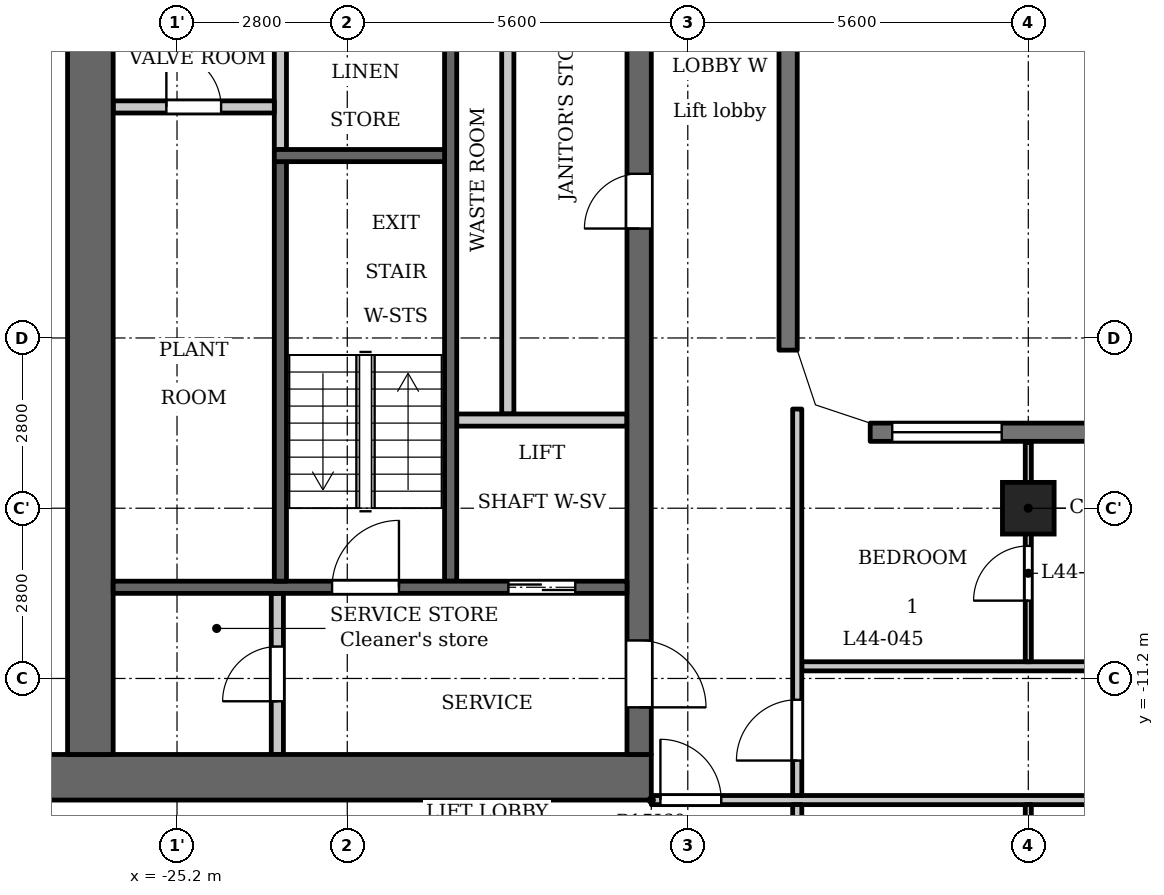
"""IFC4 building model, lengths in metres.
Left out: names, types, materials, properties, quantities, classifications, styles, units other than length and angle.
Written with IfcOpenShell. Run it as: python <this file> out.ifc"""

import sys

from ifc_helpers import new_model, si_unit, direction, frame, frame_2d, origin, origin_2d, place, context, subcontext, project, spatial, polyline, rectangle, outline, extrude, element, fill, save


model = new_model("IFC4")
c1 = context("Model", 3, precision=1e-05, world=origin(), true_north=direction((0.0, 1.0)))
c2 = subcontext(c1, "Body", "Model", "MODEL_VIEW")
j1 = project(units=[si_unit("LENGTHUNIT", "METRE"), si_unit("PLANEANGLEUNIT", "RADIAN")], contexts=[c1])
p1 = place(None, origin())
s1 = spatial("IfcSite", under=j1, at=p1, CompositionType="ELEMENT")
p2 = place(p1, origin())
s2 = spatial("IfcBuilding", under=s1, at=p2, CompositionType="ELEMENT")
p3 = place(p2, frame((0.0, 0.0, 171.1)))
s3 = spatial("IfcBuildingStorey", under=s2, at=p3, CompositionType="ELEMENT", Elevation=171.1)
p4 = place(p3, frame((-11.2, -8.4, 0.0), z_axis=(0.0, 0.0, 1.0), x_axis=(1.0, 0.0, 0.0)))
e1 = element("IfcColumn", 1, at=p4, inside=s3, PredefinedType="COLUMN", context=c2, shape_type="SweptSolid", body=[
    extrude(rectangle(XDim=0.85, YDim=0.85, at=origin_2d()), origin(), (0.0, 0.0, 1.0), 3.5),
])
p5 = place(p3, frame((-15.15, -5.8, 0.0), z_axis=(0.0, 0.0, 1.0), x_axis=(0.0, 1.0, 0.0)))
e2 = element("IfcWall", 2, at=p5, inside=s3, PredefinedType="SOLIDWALL", context=c2, shape_type="SweptSolid", body=[
    extrude(rectangle(XDim=11.6, YDim=0.3, at=frame_2d((5.8, 0.0))), origin(), (0.0, 0.0, 1.0), 3.2),
])
p6 = place(p3, frame((13.8, -7.15, 0.0), z_axis=(0.0, 0.0, 1.0), x_axis=(-1.0, 0.0, 0.0)))
e3 = element("IfcWall", 3, at=p6, inside=s3, PredefinedType="SOLIDWALL", context=c2, shape_type="SweptSolid", body=[
    extrude(rectangle(XDim=27.6, YDim=0.3, at=frame_2d((13.8, 0.0))), origin(), (0.0, 0.0, 1.0), 3.2),
])
p7 = place(p6, frame((0.363, 0.0, 0.9)))
e4 = element("IfcOpeningElement", 4, at=p7, cuts=e3, PredefinedType="OPENING", context=c2, shape_type="SweptSolid", body=[
    extrude(rectangle(XDim=1.8, YDim=1.25, at=frame_2d((0.9, 0.625))), frame((0.0, 0.16, 0.0), z_axis=(0.0, -1.0, 0.0), x_axis=(1.0, 0.0, 0.0)), (0.0, 0.0, 1.0), 0.32),
])
p8 = place(p6, frame((3.6, 0.0, 1.2)))
e5 = element("IfcOpeningElement", 5, at=p8, cuts=e3, PredefinedType="OPENING", context=c2, shape_type="SweptSolid", body=[
    extrude(rectangle(XDim=3.6, YDim=0.95, at=frame_2d((1.8, 0.475))), frame((0.0, 0.16, 0.0), z_axis=(0.0, -1.0, 0.0), x_axis=(1.0, 0.0, 0.0)), (0.0, 0.0, 1.0), 0.32),
])
p9 = place(p6, frame((8.9, 0.0, 0.9)))
e6 = element("IfcOpeningElement", 6, at=p9, cuts=e3, PredefinedType="OPENING", context=c2, shape_type="SweptSolid", body=[
    extrude(rectangle(XDim=1.8, YDim=1.25, at=frame_2d((0.9, 0.625))), frame((0.0, 0.16, 0.0), z_axis=(0.0, -1.0, 0.0), x_axis=(1.0, 0.0, 0.0)), (0.0, 0.0, 1.0), 0.32),
])
p10 = place(p6, frame((12.0, 0.0, 0.6)))
e7 = element("IfcOpeningElement", 7, at=p10, cuts=e3, PredefinedType="OPENING", context=c2, shape_type="SweptSolid", body=[
    extrude(rectangle(XDim=1.2, YDim=1.55, at=frame_2d((0.6, 0.775))), frame((0.0, 0.16, 0.0), z_axis=(0.0, -1.0, 0.0), x_axis=(1.0, 0.0, 0.0)), (0.0, 0.0, 1.0), 0.32),
])
p11 = place(p6, frame((14.4, 0.0, 0.6)))
e8 = element("IfcOpeningElement", 8, at=p11, cuts=e3, PredefinedType="OPENING", context=c2, shape_type="SweptSolid", body=[
    extrude(rectangle(XDim=1.2, YDim=1.55, at=frame_2d((0.6, 0.775))), frame((0.0, 0.16, 0.0), z_axis=(0.0, -1.0, 0.0), x_axis=(1.0, 0.0, 0.0)), (0.0, 0.0, 1.0), 0.32),
])
p12 = place(p6, frame((16.9, 0.0, 0.9)))
e9 = element("IfcOpeningElement", 9, at=p12, cuts=e3, PredefinedType="OPENING", context=c2, shape_type="SweptSolid", body=[
    extrude(rectangle(XDim=1.8, YDim=1.25, at=frame_2d((0.9, 0.625))), frame((0.0, 0.16, 0.0), z_axis=(0.0, -1.0, 0.0), x_axis=(1.0, 0.0, 0.0)), (0.0, 0.0, 1.0), 0.32),
])
p13 = place(p6, frame((20.4, 0.0, 1.2)))
e10 = element("IfcOpeningElement", 10, at=p13, cuts=e3, PredefinedType="OPENING", context=c2, shape_type="SweptSolid", body=[
    extrude(rectangle(XDim=3.6, YDim=0.95, at=frame_2d((1.8, 0.475))), frame((0.0, 0.16, 0.0), z_axis=(0.0, -1.0, 0.0), x_axis=(1.0, 0.0, 0.0)), (0.0, 0.0, 1.0), 0.32),
])
p14 = place(p6, frame((25.438, 0.0, 0.9)))
e11 = element("IfcOpeningElement", 11, at=p14, cuts=e3, PredefinedType="OPENING", context=c2, shape_type="SweptSolid", body=[
    extrude(rectangle(XDim=1.8, YDim=1.25, at=frame_2d((0.9, 0.625))), frame((0.0, 0.16, 0.0), z_axis=(0.0, -1.0, 0.0), x_axis=(1.0, 0.0, 0.0)), (0.0, 0.0, 1.0), 0.32),
])
p15 = place(p3, frame((-23.5, -2.5, 0.0), z_axis=(0.0, 0.0, 1.0), x_axis=(0.0, 1.0, 0.0)))
e12 = element("IfcWall", 12, at=p15, inside=s3, PredefinedType="PARTITIONING", context=c2, shape_type="SweptSolid", body=[
    extrude(rectangle(XDim=2.65, YDim=0.2, at=frame_2d((1.325, 0.0))), origin(), (0.0, 0.0, 1.0), 3.2),
])
p16 = place(p3, frame((-20.7, -9.6, 0.0), z_axis=(0.0, 0.0, 1.0), x_axis=(0.0, 1.0, 0.0)))
e13 = element("IfcWall", 13, at=p16, inside=s3, PredefinedType="SHEAR", context=c2, shape_type="SweptSolid", body=[
    extrude(rectangle(XDim=9.75, YDim=0.2, at=frame_2d((4.875, 0.0))), origin(), (0.0, 0.0, 1.0), 3.2),
])
p17 = place(p3, frame((-17.4, -12.825, 0.0), z_axis=(0.0, 0.0, 1.0), x_axis=(-1.0, 0.0, 0.0)))
e14 = element("IfcWall", 14, at=p17, inside=s3, PredefinedType="SHEAR", context=c2, shape_type="SweptSolid", body=[
    extrude(rectangle(XDim=10.4, YDim=0.75, at=frame_2d((5.2, 0.0))), origin(), (0.0, 0.0, 1.0), 3.2),
])
p18 = place(p3, frame((-19.76, -6.85, 0.0), z_axis=(0.0, 0.0, 1.0), x_axis=(0.0, 1.0, 0.0)))
e15 = element("IfcWall", 15, at=p18, inside=s3, PredefinedType="PARTITIONING", context=c2, shape_type="SweptSolid", body=[
    extrude(rectangle(XDim=7.0, YDim=0.2, at=frame_2d((3.5, 0.0))), origin(), (0.0, 0.0, 1.0), 3.2),
])
p19 = place(p3, frame((-17.6, -12.45, 0.0), z_axis=(0.0, 0.0, 1.0), x_axis=(0.0, 1.0, 0.0)))
e16 = element("IfcWall", 16, at=p19, inside=s3, PredefinedType="SHEAR", context=c2, shape_type="SweptSolid", body=[
    extrude(rectangle(XDim=24.9, YDim=0.4, at=frame_2d((12.45, 0.0))), origin(), (0.0, 0.0, 1.0), 3.2),
])
p20 = place(p19, frame((8.65, 0.0, 0.0)))
e17 = element("IfcOpeningElement", 17, at=p20, cuts=e16, PredefinedType="OPENING", context=c2, shape_type="SweptSolid", body=[
    extrude(rectangle(XDim=0.9, YDim=2.1, at=frame_2d((0.45, 1.05))), frame((0.0, 0.21, 0.0), z_axis=(0.0, -1.0, 0.0), x_axis=(1.0, 0.0, 0.0)), (0.0, 0.0, 1.0), 0.42),
])
p21 = place(p19, frame((15.6, 0.0, 0.0)))
e18 = element("IfcOpeningElement", 18, at=p21, cuts=e16, PredefinedType="OPENING", context=c2, shape_type="SweptSolid", body=[
    extrude(rectangle(XDim=1.1, YDim=2.1, at=frame_2d((0.55, 1.05))), frame((0.0, 0.21, 0.0), z_axis=(0.0, -1.0, 0.0), x_axis=(1.0, 0.0, 0.0)), (0.0, 0.0, 1.0), 0.42),
])
p22 = place(p19, frame((18.0, 0.0, 0.0)))
e19 = element("IfcOpeningElement", 19, at=p22, cuts=e16, PredefinedType="OPENING", context=c2, shape_type="SweptSolid", body=[
    extrude(rectangle(XDim=1.1, YDim=2.1, at=frame_2d((0.55, 1.05))), frame((0.0, 0.21, 0.0), z_axis=(0.0, -1.0, 0.0), x_axis=(1.0, 0.0, 0.0)), (0.0, 0.0, 1.0), 0.42),
])
p23 = place(p19, frame((23.025, 0.0, 0.0)))
e20 = element("IfcOpeningElement", 20, at=p23, cuts=e16, PredefinedType="OPENING", context=c2, shape_type="SweptSolid", body=[
    extrude(rectangle(XDim=1.1, YDim=2.1, at=frame_2d((0.55, 1.05))), frame((0.0, 0.21, 0.0), z_axis=(0.0, -1.0, 0.0), x_axis=(1.0, 0.0, 0.0)), (0.0, 0.0, 1.0), 0.42),
])
p24 = place(p19, frame((0.775, 0.0, 0.0)))
e21 = element("IfcOpeningElement", 21, at=p24, cuts=e16, PredefinedType="OPENING", context=c2, shape_type="SweptSolid", body=[
    extrude(rectangle(XDim=1.1, YDim=2.1, at=frame_2d((0.55, 1.05))), frame((0.0, 0.21, 0.0), z_axis=(0.0, -1.0, 0.0), x_axis=(1.0, 0.0, 0.0)), (0.0, 0.0, 1.0), 0.42),
])
p25 = place(p19, frame((12.925, 0.0, 0.0)))
e22 = element("IfcOpeningElement", 22, at=p25, cuts=e16, PredefinedType="OPENING", context=c2, shape_type="SweptSolid", body=[
    extrude(rectangle(XDim=1.8, YDim=2.1, at=frame_2d((0.9, 1.05))), frame((0.0, 0.21, 0.0), z_axis=(0.0, -1.0, 0.0), x_axis=(1.0, 0.0, 0.0)), (0.0, 0.0, 1.0), 0.42),
])
p26 = place(p3, frame((-26.625, -12.45, 0.0), z_axis=(0.0, 0.0, 1.0), x_axis=(0.0, 1.0, 0.0)))
e23 = element("IfcWall", 23, at=p26, inside=s3, PredefinedType="SHEAR", context=c2, shape_type="SweptSolid", body=[
    extrude(rectangle(XDim=24.9, YDim=0.75, at=frame_2d((12.45, 0.0))), origin(), (0.0, 0.0, 1.0), 3.2),
])
p27 = place(p3, frame((-23.55, -12.45, 0.0), z_axis=(0.0, 0.0, 1.0), x_axis=(0.0, 1.0, 0.0)))
e24 = element("IfcWall", 24, at=p27, inside=s3, PredefinedType="PARTITIONING", context=c2, shape_type="SweptSolid", body=[
    extrude(rectangle(XDim=2.65, YDim=0.2, at=frame_2d((1.325, 0.0))), origin(), (0.0, 0.0, 1.0), 3.2),
])
p28 = place(p27, frame((0.875, 0.0, 0.0)))
e25 = element("IfcOpeningElement", 25, at=p28, cuts=e24, PredefinedType="OPENING", context=c2, shape_type="SweptSolid", body=[
    extrude(rectangle(XDim=0.9, YDim=2.1, at=frame_2d((0.45, 1.05))), frame((0.0, 0.11, 0.0), z_axis=(0.0, -1.0, 0.0), x_axis=(1.0, 0.0, 0.0)), (0.0, 0.0, 1.0), 0.22),
])
p29 = place(p3, frame((-23.6, -1.8, 0.0), z_axis=(0.0, 0.0, 1.0), x_axis=(-1.0, 0.0, 0.0)))
e26 = element("IfcWall", 26, at=p29, inside=s3, PredefinedType="PARTITIONING", context=c2, shape_type="SweptSolid", body=[
    extrude(rectangle(XDim=2.65, YDim=0.2, at=frame_2d((1.325, 0.0))), origin(), (0.0, 0.0, 1.0), 3.2),
])
p30 = place(p29, frame((0.875, 0.0, 0.0)))
e27 = element("IfcOpeningElement", 27, at=p30, cuts=e26, PredefinedType="OPENING", context=c2, shape_type="SweptSolid", body=[
    extrude(rectangle(XDim=0.9, YDim=2.1, at=frame_2d((0.45, 1.05))), frame((0.0, 0.11, 0.0), z_axis=(0.0, -1.0, 0.0), x_axis=(1.0, 0.0, 0.0)), (0.0, 0.0, 1.0), 0.22),
])
p31 = place(p3, frame((-17.8, -9.7, 0.0), z_axis=(0.0, 0.0, 1.0), x_axis=(-1.0, 0.0, 0.0)))
e28 = element("IfcWall", 28, at=p31, inside=s3, PredefinedType="SHEAR", context=c2, shape_type="SweptSolid", body=[
    extrude(rectangle(XDim=8.45, YDim=0.2, at=frame_2d((4.225, 0.0))), origin(), (0.0, 0.0, 1.0), 3.2),
])
p32 = place(p31, frame((0.85, 0.0, 0.0)))
e29 = element("IfcOpeningElement", 29, at=p32, cuts=e28, PredefinedType="OPENING", context=c2, shape_type="SweptSolid", body=[
    extrude(rectangle(XDim=1.1, YDim=2.1, at=frame_2d((0.55, 1.05))), frame((0.0, 0.11, 0.0), z_axis=(0.0, -1.0, 0.0), x_axis=(1.0, 0.0, 0.0)), (0.0, 0.0, 1.0), 0.22),
])
p33 = place(p31, frame((3.75, 0.0, 0.0)))
e30 = element("IfcOpeningElement", 30, at=p33, cuts=e28, PredefinedType="OPENING", context=c2, shape_type="SweptSolid", body=[
    extrude(rectangle(XDim=1.1, YDim=2.1, at=frame_2d((0.55, 1.05))), frame((0.0, 0.11, 0.0), z_axis=(0.0, -1.0, 0.0), x_axis=(1.0, 0.0, 0.0)), (0.0, 0.0, 1.0), 0.22),
])
p34 = place(p3, frame((-17.8, -6.95, 0.0), z_axis=(0.0, 0.0, 1.0), x_axis=(-1.0, 0.0, 0.0)))
e31 = element("IfcWall", 31, at=p34, inside=s3, PredefinedType="PARTITIONING", context=c2, shape_type="SweptSolid", body=[
    extrude(rectangle(XDim=2.8, YDim=0.2, at=frame_2d((1.4, 0.0))), origin(), (0.0, 0.0, 1.0), 3.2),
])
p35 = place(p3, frame((-23.5, -9.6, 0.0), z_axis=(0.0, 0.0, 1.0), x_axis=(0.0, 1.0, 0.0)))
e32 = element("IfcWall", 32, at=p35, inside=s3, PredefinedType="SHEAR", context=c2, shape_type="SweptSolid", body=[
    extrude(rectangle(XDim=6.9, YDim=0.2, at=frame_2d((3.45, 0.0))), origin(), (0.0, 0.0, 1.0), 3.2),
])
p36 = place(p3, frame((-20.8, -2.6, 0.0), z_axis=(0.0, 0.0, 1.0), x_axis=(-1.0, 0.0, 0.0)))
e33 = element("IfcWall", 33, at=p36, inside=s3, PredefinedType="SHEAR", context=c2, shape_type="SweptSolid", body=[
    extrude(rectangle(XDim=2.8, YDim=0.2, at=frame_2d((1.4, 0.0))), origin(), (0.0, 0.0, 1.0), 3.2),
])
p37 = place(p3, frame((-17.4, -13.2, 0.0), z_axis=(0.0, 0.0, 1.0), x_axis=(1.0, 0.0, 0.0)))
e34 = element("IfcWall", 34, at=p37, inside=s3, PredefinedType="PARTITIONING", context=c2, shape_type="SweptSolid", body=[
    extrude(rectangle(XDim=34.8, YDim=0.15, at=frame_2d((17.4, 0.0))), origin(), (0.0, 0.0, 1.0), 3.2),
])
p38 = place(p37, frame((0.15, 0.0, 0.0)))
e35 = element("IfcOpeningElement", 35, at=p38, cuts=e34, PredefinedType="OPENING", context=c2, shape_type="SweptSolid", body=[
    extrude(rectangle(XDim=1.0, YDim=2.1, at=frame_2d((0.5, 1.05))), frame((0.0, 0.085, 0.0), z_axis=(0.0, -1.0, 0.0), x_axis=(1.0, 0.0, 0.0)), (0.0, 0.0, 1.0), 0.17),
])
p39 = place(p37, frame((33.55, 0.0, 0.0)))
e36 = element("IfcOpeningElement", 36, at=p39, cuts=e34, PredefinedType="OPENING", context=c2, shape_type="SweptSolid", body=[
    extrude(rectangle(XDim=1.0, YDim=2.1, at=frame_2d((0.5, 1.05))), frame((0.0, 0.085, 0.0), z_axis=(0.0, -1.0, 0.0), x_axis=(1.0, 0.0, 0.0)), (0.0, 0.0, 1.0), 0.17),
])
p40 = place(p37, frame((15.7, 0.0, 0.0)))
e37 = element("IfcOpeningElement", 37, at=p40, cuts=e34, PredefinedType="OPENING", context=c2, shape_type="SweptSolid", body=[
    extrude(rectangle(XDim=1.0, YDim=2.1, at=frame_2d((0.5, 1.05))), frame((0.0, 0.085, 0.0), z_axis=(0.0, -1.0, 0.0), x_axis=(1.0, 0.0, 0.0)), (0.0, 0.0, 1.0), 0.17),
])
p41 = place(p37, frame((26.9, 0.0, 0.0)))
e38 = element("IfcOpeningElement", 38, at=p41, cuts=e34, PredefinedType="OPENING", context=c2, shape_type="SweptSolid", body=[
    extrude(rectangle(XDim=1.0, YDim=2.1, at=frame_2d((0.5, 1.05))), frame((0.0, 0.085, 0.0), z_axis=(0.0, -1.0, 0.0), x_axis=(1.0, 0.0, 0.0)), (0.0, 0.0, 1.0), 0.17),
])
p42 = place(p3, frame((-14.925, -11.0, 0.0), z_axis=(0.0, 0.0, 1.0), x_axis=(1.0, 0.0, 0.0)))
e39 = element("IfcWall", 39, at=p42, inside=s3, PredefinedType="PARTITIONING", context=c2, shape_type="SweptSolid", body=[
    extrude(rectangle(XDim=29.85, YDim=0.15, at=frame_2d((14.925, 0.0))), origin(), (0.0, 0.0, 1.0), 3.2),
])
p43 = place(p42, frame((9.875, 0.0, 0.0)))
e40 = element("IfcOpeningElement", 40, at=p43, cuts=e39, PredefinedType="OPENING", context=c2, shape_type="SweptSolid", body=[
    extrude(rectangle(XDim=1.0, YDim=2.1, at=frame_2d((0.5, 1.05))), frame((0.0, 0.085, 0.0), z_axis=(0.0, -1.0, 0.0), x_axis=(1.0, 0.0, 0.0)), (0.0, 0.0, 1.0), 0.17),
])
p44 = place(p42, frame((17.875, 0.0, 0.0)))
e41 = element("IfcOpeningElement", 41, at=p44, cuts=e39, PredefinedType="OPENING", context=c2, shape_type="SweptSolid", body=[
    extrude(rectangle(XDim=1.0, YDim=2.1, at=frame_2d((0.5, 1.05))), frame((0.0, 0.085, 0.0), z_axis=(0.0, -1.0, 0.0), x_axis=(1.0, 0.0, 0.0)), (0.0, 0.0, 1.0), 0.17),
])
p45 = place(p3, frame((-15.0, -15.325, 0.0), z_axis=(0.0, 0.0, 1.0), x_axis=(0.0, 1.0, 0.0)))
e42 = element("IfcWall", 42, at=p45, inside=s3, PredefinedType="PARTITIONING", context=c2, shape_type="SweptSolid", body=[
    extrude(rectangle(XDim=2.05, YDim=0.15, at=frame_2d((1.025, 0.0))), origin(), (0.0, 0.0, 1.0), 3.2),
])
p46 = place(p45, frame((0.574, 0.0, 0.0)))
e43 = element("IfcOpeningElement", 43, at=p46, cuts=e42, PredefinedType="OPENING", context=c2, shape_type="SweptSolid", body=[
    extrude(rectangle(XDim=1.0, YDim=2.1, at=frame_2d((0.5, 1.05))), frame((0.0, 0.085, 0.0), z_axis=(0.0, -1.0, 0.0), x_axis=(1.0, 0.0, 0.0)), (0.0, 0.0, 1.0), 0.17),
])
p47 = place(p3, frame((-15.0, -13.125, 0.0), z_axis=(0.0, 0.0, 1.0), x_axis=(0.0, 1.0, 0.0)))
e44 = element("IfcWall", 44, at=p47, inside=s3, PredefinedType="PARTITIONING", context=c2, shape_type="SweptSolid", body=[
    extrude(rectangle(XDim=6.356, YDim=0.15, at=frame_2d((3.178, 0.0))), origin(), (0.0, 0.0, 1.0), 3.2),
])
p48 = place(p47, frame((0.575, 0.0, 0.0)))
e45 = element("IfcOpeningElement", 45, at=p48, cuts=e44, PredefinedType="OPENING", context=c2, shape_type="SweptSolid", body=[
    extrude(rectangle(XDim=1.0, YDim=2.1, at=frame_2d((0.5, 1.05))), frame((0.0, 0.085, 0.0), z_axis=(0.0, -1.0, 0.0), x_axis=(1.0, 0.0, 0.0)), (0.0, 0.0, 1.0), 0.17),
])
p49 = place(p3, frame((-11.2, -15.85, 0.0), z_axis=(0.0, 0.0, 1.0), x_axis=(0.0, 1.0, 0.0)))
e46 = element("IfcWall", 46, at=p49, inside=s3, PredefinedType="PARTITIONING", context=c2, shape_type="SweptSolid", body=[
    extrude(rectangle(XDim=2.575, YDim=0.1, at=frame_2d((1.288, 0.0))), origin(), (0.0, 0.0, 1.0), 3.2),
])
p50 = place(p3, frame((-11.2, -10.925, 0.0), z_axis=(0.0, 0.0, 1.0), x_axis=(0.0, 1.0, 0.0)))
e47 = element("IfcWall", 47, at=p50, inside=s3, PredefinedType="PARTITIONING", context=c2, shape_type="SweptSolid", body=[
    extrude(rectangle(XDim=3.605, YDim=0.1, at=frame_2d((1.802, 0.0))), origin(), (0.0, 0.0, 1.0), 3.2),
])
p51 = place(p50, frame((1.005, 0.0, 0.0)))
e48 = element("IfcOpeningElement", 48, at=p51, cuts=e47, PredefinedType="OPENING", context=c2, shape_type="SweptSolid", body=[
    extrude(rectangle(XDim=0.9, YDim=2.1, at=frame_2d((0.45, 1.05))), frame((0.0, 0.06, 0.0), z_axis=(0.0, -1.0, 0.0), x_axis=(1.0, 0.0, 0.0)), (0.0, 0.0, 1.0), 0.12),
])
p52 = place(p3, origin())
e49 = element("IfcWall", 49, at=p52, inside=s3, PredefinedType="SOLIDWALL", context=c2, shape_type="SweptSolid", body=[
    extrude(outline(polyline([(-14.937, -6.937), (-13.849, -7.3), (-13.8, -7.3), (-13.8, -7.0), (-14.7, -6.7), (-15.0, -5.8), (-15.3, -5.8), (-15.3, -5.849), (-14.937, -6.937)])), origin(), (0.0, 0.0, 1.0), 3.2),
])
p53 = place(p32, origin())
e50 = element("IfcDoor", 50, at=p53, inside=s3, OperationType="DOUBLE_DOOR_SLIDING", PredefinedType="DOOR", context=c2, shape_type="SweptSolid", body=[
    extrude(rectangle(XDim=1.1, YDim=2.1, at=frame_2d((0.55, 1.05))), frame((0.0, 0.025, 0.0), z_axis=(0.0, -1.0, 0.0), x_axis=(1.0, 0.0, 0.0)), (0.0, 0.0, 1.0), 0.05),
])
fill(e29, e50)
p54 = place(p20, origin())
e51 = element("IfcDoor", 51, at=p54, inside=s3, OperationType="SINGLE_SWING_RIGHT", PredefinedType="DOOR", context=c2, shape_type="SweptSolid", body=[
    extrude(rectangle(XDim=0.9, YDim=2.1, at=frame_2d((0.45, 1.05))), frame((0.0, 0.025, 0.0), z_axis=(0.0, -1.0, 0.0), x_axis=(1.0, 0.0, 0.0)), (0.0, 0.0, 1.0), 0.05),
])
fill(e17, e51)
p55 = place(p24, origin())
e52 = element("IfcDoor", 52, at=p55, inside=s3, OperationType="SINGLE_SWING_LEFT", PredefinedType="DOOR", context=c2, shape_type="SweptSolid", body=[
    extrude(rectangle(XDim=1.1, YDim=2.1, at=frame_2d((0.55, 1.05))), frame((0.0, 0.025, 0.0), z_axis=(0.0, -1.0, 0.0), x_axis=(1.0, 0.0, 0.0)), (0.0, 0.0, 1.0), 0.05),
])
fill(e21, e52)
p56 = place(p28, origin())
e53 = element("IfcDoor", 53, at=p56, inside=s3, OperationType="SINGLE_SWING_RIGHT", PredefinedType="DOOR", context=c2, shape_type="SweptSolid", body=[
    extrude(rectangle(XDim=0.9, YDim=2.1, at=frame_2d((0.45, 1.05))), frame((0.0, 0.025, 0.0), z_axis=(0.0, -1.0, 0.0), x_axis=(1.0, 0.0, 0.0)), (0.0, 0.0, 1.0), 0.05),
])
fill(e25, e53)
p57 = place(p33, origin())
e54 = element("IfcDoor", 54, at=p57, inside=s3, OperationType="SINGLE_SWING_LEFT", PredefinedType="DOOR", context=c2, shape_type="SweptSolid", body=[
    extrude(rectangle(XDim=1.1, YDim=2.1, at=frame_2d((0.55, 1.05))), frame((0.0, 0.025, 0.0), z_axis=(0.0, -1.0, 0.0), x_axis=(1.0, 0.0, 0.0)), (0.0, 0.0, 1.0), 0.05),
])
fill(e30, e54)
p58 = place(p30, origin())
e55 = element("IfcDoor", 55, at=p58, inside=s3, OperationType="SINGLE_SWING_RIGHT", PredefinedType="DOOR", context=c2, shape_type="SweptSolid", body=[
    extrude(rectangle(XDim=0.9, YDim=2.1, at=frame_2d((0.45, 1.05))), frame((0.0, 0.025, 0.0), z_axis=(0.0, -1.0, 0.0), x_axis=(1.0, 0.0, 0.0)), (0.0, 0.0, 1.0), 0.05),
])
fill(e27, e55)
p59 = place(p48, origin())
e56 = element("IfcDoor", 56, at=p59, inside=s3, OperationType="SINGLE_SWING_RIGHT", PredefinedType="DOOR", context=c2, shape_type="SweptSolid", body=[
    extrude(rectangle(XDim=1.0, YDim=2.1, at=frame_2d((0.5, 1.05))), frame((0.0, 0.025, 0.0), z_axis=(0.0, -1.0, 0.0), x_axis=(1.0, 0.0, 0.0)), (0.0, 0.0, 1.0), 0.05),
])
fill(e45, e56)
p60 = place(p38, origin())
e57 = element("IfcDoor", 57, at=p60, inside=s3, OperationType="SINGLE_SWING_RIGHT", PredefinedType="DOOR", context=c2, shape_type="SweptSolid", body=[
    extrude(rectangle(XDim=1.0, YDim=2.1, at=frame_2d((0.5, 1.05))), frame((0.0, 0.025, 0.0), z_axis=(0.0, -1.0, 0.0), x_axis=(1.0, 0.0, 0.0)), (0.0, 0.0, 1.0), 0.05),
])
fill(e35, e57)
p61 = place(p51, origin())
e58 = element("IfcDoor", 58, at=p61, inside=s3, OperationType="SINGLE_SWING_RIGHT", PredefinedType="DOOR", context=c2, shape_type="SweptSolid", body=[
    extrude(rectangle(XDim=0.9, YDim=2.1, at=frame_2d((0.45, 1.05))), frame((0.0, 0.025, 0.0), z_axis=(0.0, -1.0, 0.0), x_axis=(1.0, 0.0, 0.0)), (0.0, 0.0, 1.0), 0.05),
])
fill(e48, e58)
p62 = place(p14, origin())
e59 = element("IfcWindow", 59, at=p62, inside=s3, PartitioningType="SINGLE_PANEL", PredefinedType="WINDOW", context=c2, shape_type="SweptSolid", body=[
    extrude(rectangle(XDim=1.8, YDim=1.25, at=frame_2d((0.9, 0.625))), frame((0.0, 0.03, 0.0), z_axis=(0.0, -1.0, 0.0), x_axis=(1.0, 0.0, 0.0)), (0.0, 0.0, 1.0), 0.06),
])
fill(e11, e59)
save(model, sys.argv[1])
